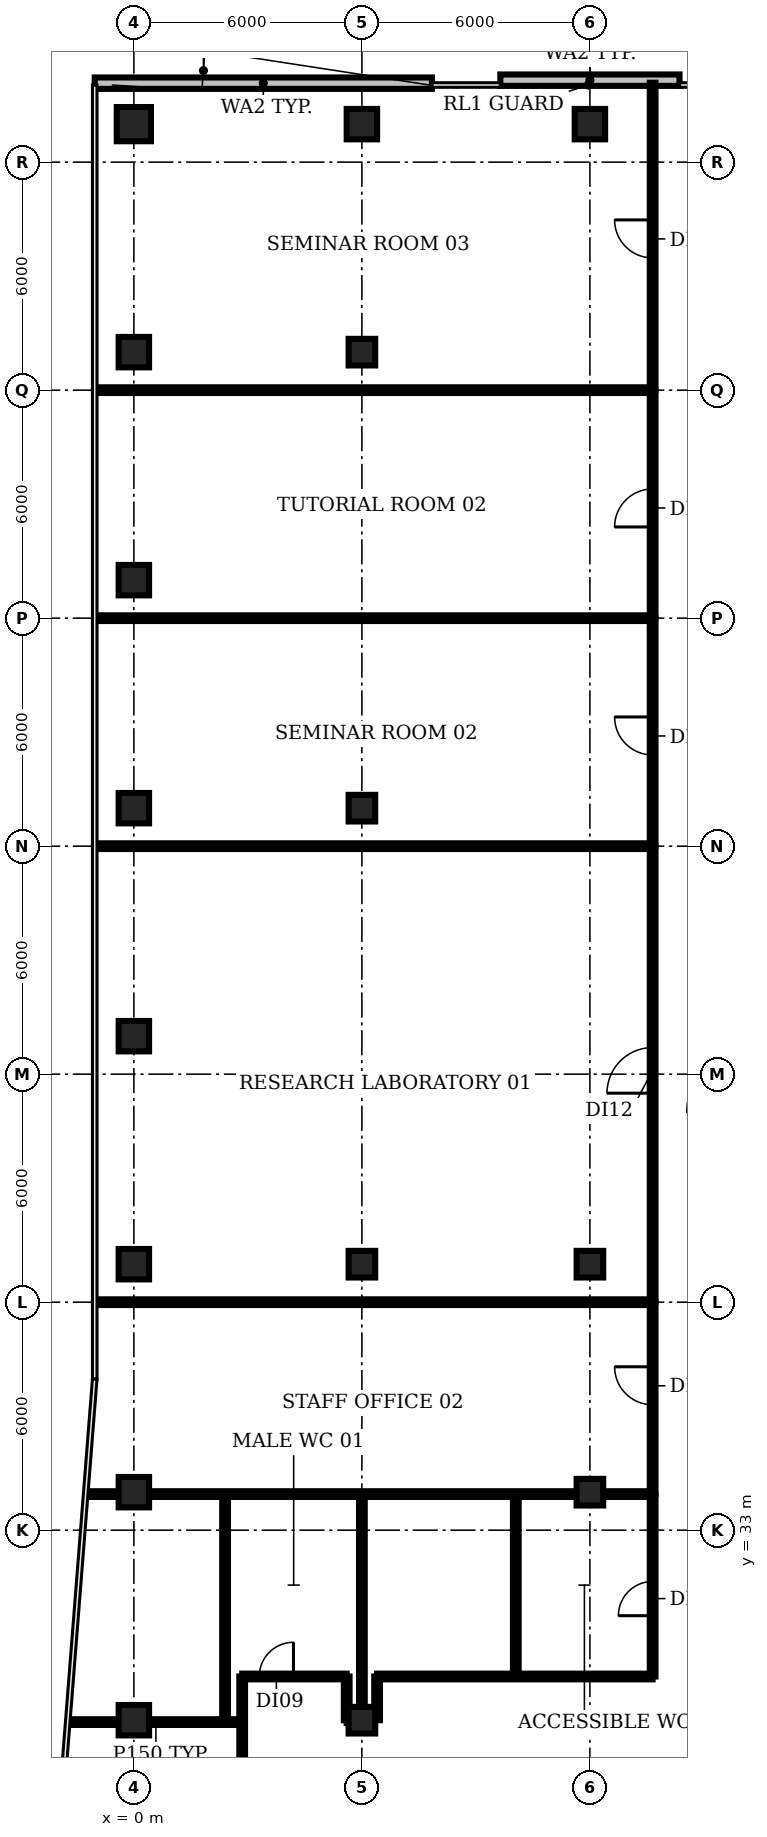
"""IFC4 building model, lengths in metres.
Left out: names, types, materials, properties, quantities, classifications, styles, units other than length and angle.
Written with IfcOpenShell. Run it as: python <this file> out.ifc"""

import sys

from ifc_helpers import new_model, si_unit, direction, frame, frame_2d, origin, origin_2d, place, context, subcontext, project, spatial, rectangle, circle, extrude, element, fill, save


model = new_model("IFC4")
c1 = context("Model", 3, precision=1e-05, world=origin(), true_north=direction((0.0, 1.0)))
c2 = subcontext(c1, "Body", "Model", "MODEL_VIEW")
j1 = project(units=[si_unit("LENGTHUNIT", "METRE"), si_unit("PLANEANGLEUNIT", "RADIAN")], contexts=[c1])
p1 = place(None, origin())
s1 = spatial("IfcSite", under=j1, at=p1, CompositionType="ELEMENT")
p2 = place(p1, origin())
s2 = spatial("IfcBuilding", under=s1, at=p2, CompositionType="ELEMENT")
p3 = place(p2, frame((0.0, 0.0, 247.4)))
s3 = spatial("IfcBuildingStorey", under=s2, at=p3, CompositionType="ELEMENT", Elevation=247.4)
for number, where, z_axis, x_axis in (
    (1, (0.0, 28.0, 0.0), (0.0, 0.0, 1.0), (1.0, 0.0, 0.0)),
    (2, (0.0, 34.0, 0.0), (0.0, 0.0, 1.0), (1.0, 0.0, 0.0)),
    (3, (0.0, 40.0, 0.0), (0.0, 0.0, 1.0), (1.0, 0.0, 0.0)),
    (4, (0.0, 46.0, 0.0), (0.0, 0.0, 1.0), (1.0, 0.0, 0.0)),
    (5, (0.0, 52.0, 0.0), (0.0, 0.0, 1.0), (1.0, 0.0, 0.0)),
    (6, (0.0, 58.0, 0.0), (0.0, 0.0, 1.0), (1.0, 0.0, 0.0)),
    (7, (0.0, 64.0, 0.0), (0.0, 0.0, 1.0), (1.0, 0.0, 0.0)),
):
    element("IfcColumn", number, at=place(p3, frame(where, z_axis=z_axis, x_axis=x_axis)), inside=s3, PredefinedType="COLUMN", context=c2, shape_type="SweptSolid", body=[
        extrude(rectangle(XDim=0.8, YDim=0.8, at=origin_2d()), origin(), (0.0, 0.0, 1.0), 3.85),
    ])
p4 = place(p3, frame((0.0, 70.0, 0.0), z_axis=(0.0, 0.0, 1.0), x_axis=(1.0, 0.0, 0.0)))
e8 = element("IfcColumn", 8, at=p4, inside=s3, PredefinedType="COLUMN", context=c2, shape_type="SweptSolid", body=[
    extrude(circle(Radius=0.45, at=origin_2d()), origin(), (0.0, 0.0, 1.0), 3.85),
])
for number, where, z_axis, x_axis in (
    (9, (6.0, 28.0, 0.0), (0.0, 0.0, 1.0), (1.0, 0.0, 0.0)),
    (10, (6.0, 40.0, 0.0), (0.0, 0.0, 1.0), (1.0, 0.0, 0.0)),
    (11, (6.0, 52.0, 0.0), (0.0, 0.0, 1.0), (1.0, 0.0, 0.0)),
    (12, (6.0, 64.0, 0.0), (0.0, 0.0, 1.0), (1.0, 0.0, 0.0)),
):
    element("IfcColumn", number, at=place(p3, frame(where, z_axis=z_axis, x_axis=x_axis)), inside=s3, PredefinedType="COLUMN", context=c2, shape_type="SweptSolid", body=[
        extrude(rectangle(XDim=0.7, YDim=0.7, at=origin_2d()), origin(), (0.0, 0.0, 1.0), 3.85),
    ])
p5 = place(p3, frame((6.0, 70.0, 0.0), z_axis=(0.0, 0.0, 1.0), x_axis=(1.0, 0.0, 0.0)))
e13 = element("IfcColumn", 13, at=p5, inside=s3, PredefinedType="COLUMN", context=c2, shape_type="SweptSolid", body=[
    extrude(rectangle(XDim=0.8, YDim=0.8, at=origin_2d()), origin(), (0.0, 0.0, 1.0), 3.85),
])
for number, where, z_axis, x_axis in (
    (14, (12.0, 34.0, 0.0), (0.0, 0.0, 1.0), (1.0, 0.0, 0.0)),
    (15, (12.0, 40.0, 0.0), (0.0, 0.0, 1.0), (1.0, 0.0, 0.0)),
):
    element("IfcColumn", number, at=place(p3, frame(where, z_axis=z_axis, x_axis=x_axis)), inside=s3, PredefinedType="COLUMN", context=c2, shape_type="SweptSolid", body=[
        extrude(rectangle(XDim=0.7, YDim=0.7, at=origin_2d()), origin(), (0.0, 0.0, 1.0), 3.85),
    ])
p6 = place(p3, frame((12.0, 70.0, 0.0), z_axis=(0.0, 0.0, 1.0), x_axis=(1.0, 0.0, 0.0)))
e16 = element("IfcColumn", 16, at=p6, inside=s3, PredefinedType="COLUMN", context=c2, shape_type="SweptSolid", body=[
    extrude(rectangle(XDim=0.8, YDim=0.8, at=origin_2d()), origin(), (0.0, 0.0, 1.0), 3.85),
])
p7 = place(p3, frame((14.357, 71.157, 0.0), z_axis=(0.0, 0.0, 1.0), x_axis=(-1.0, 0.0, 0.0)))
e17 = element("IfcWall", 17, at=p7, inside=s3, PredefinedType="SOLIDWALL", context=c2, shape_type="SweptSolid", body=[
    extrude(rectangle(XDim=4.715, YDim=0.3, at=frame_2d((2.357, 0.0))), origin(), (0.0, 0.0, 1.0), 3.85),
])
p8 = place(p3, frame((7.843, 71.078, 0.0), z_axis=(0.0, 0.0, 1.0), x_axis=(-1.0, 0.0, 0.0)))
e18 = element("IfcWall", 18, at=p8, inside=s3, PredefinedType="SOLIDWALL", context=c2, shape_type="SweptSolid", body=[
    extrude(rectangle(XDim=8.873, YDim=0.3, at=frame_2d((4.436, 0.0))), origin(), (0.0, 0.0, 1.0), 3.85),
])
p9 = place(p3, frame((-1.69, 27.95, 0.0), z_axis=(0.0, 0.0, 1.0), x_axis=(1.0, 0.0, 0.0)))
e19 = element("IfcWall", 19, at=p9, inside=s3, PredefinedType="PARTITIONING", context=c2, shape_type="SweptSolid", body=[
    extrude(rectangle(XDim=4.54, YDim=0.15, at=frame_2d((2.27, 0.0))), origin(), (0.0, 0.0, 1.0), 2.88),
])
p10 = place(p3, frame((-1.22, 33.95, 0.0), z_axis=(0.0, 0.0, 1.0), x_axis=(1.0, 0.0, 0.0)))
e20 = element("IfcWall", 20, at=p10, inside=s3, PredefinedType="PARTITIONING", context=c2, shape_type="SweptSolid", body=[
    extrude(rectangle(XDim=14.87, YDim=0.15, at=frame_2d((7.435, 0.0))), origin(), (0.0, 0.0, 1.0), 2.88),
])
for number, where, z_axis, x_axis in (
    (21, (-0.98, 39.0, 0.0), (0.0, 0.0, 1.0), (1.0, 0.0, 0.0)),
    (22, (-0.98, 51.0, 0.0), (0.0, 0.0, 1.0), (1.0, 0.0, 0.0)),
    (23, (-0.98, 57.0, 0.0), (0.0, 0.0, 1.0), (1.0, 0.0, 0.0)),
    (24, (-0.98, 63.0, 0.0), (0.0, 0.0, 1.0), (1.0, 0.0, 0.0)),
):
    element("IfcWall", number, at=place(p3, frame(where, z_axis=z_axis, x_axis=x_axis)), inside=s3, PredefinedType="PARTITIONING", context=c2, shape_type="SweptSolid", body=[
        extrude(rectangle(XDim=14.63, YDim=0.15, at=frame_2d((7.315, 0.0))), origin(), (0.0, 0.0, 1.0), 2.88),
    ])
p11 = place(p3, frame((2.4, 27.95, 0.0), z_axis=(0.0, 0.0, 1.0), x_axis=(0.0, 1.0, 0.0)))
e25 = element("IfcWall", 25, at=p11, inside=s3, PredefinedType="PARTITIONING", context=c2, shape_type="SweptSolid", body=[
    extrude(rectangle(XDim=6.0, YDim=0.15, at=frame_2d((3.0, 0.0))), origin(), (0.0, 0.0, 1.0), 2.88),
])
p12 = place(p3, frame((2.85, 25.25, 0.0), z_axis=(0.0, 0.0, 1.0), x_axis=(0.0, 1.0, 0.0)))
e26 = element("IfcWall", 26, at=p12, inside=s3, PredefinedType="PARTITIONING", context=c2, shape_type="SweptSolid", body=[
    extrude(rectangle(XDim=3.9, YDim=0.15, at=frame_2d((1.95, 0.0))), origin(), (0.0, 0.0, 1.0), 2.88),
])
p13 = place(p3, frame((2.85, 29.15, 0.0), z_axis=(0.0, 0.0, 1.0), x_axis=(1.0, 0.0, 0.0)))
e27 = element("IfcWall", 27, at=p13, inside=s3, PredefinedType="PARTITIONING", context=c2, shape_type="SweptSolid", body=[
    extrude(rectangle(XDim=2.75, YDim=0.15, at=frame_2d((1.375, 0.0))), origin(), (0.0, 0.0, 1.0), 2.88),
])
p14 = place(p13, frame((0.45, 0.0, 0.0)))
e28 = element("IfcOpeningElement", 28, at=p14, cuts=e27, PredefinedType="OPENING", context=c2, shape_type="SweptSolid", body=[
    extrude(rectangle(XDim=0.9, YDim=2.1, at=frame_2d((0.45, 1.05))), frame((0.0, 0.085, 0.0), z_axis=(0.0, -1.0, 0.0), x_axis=(1.0, 0.0, 0.0)), (0.0, 0.0, 1.0), 0.17),
])
p15 = place(p3, frame((5.6, 28.0, 0.0), z_axis=(0.0, 0.0, 1.0), x_axis=(0.0, 1.0, 0.0)))
e29 = element("IfcWall", 29, at=p15, inside=s3, PredefinedType="PARTITIONING", context=c2, shape_type="SweptSolid", body=[
    extrude(rectangle(XDim=1.15, YDim=0.15, at=frame_2d((0.575, 0.0))), origin(), (0.0, 0.0, 1.0), 2.88),
])
p16 = place(p3, frame((5.6, 28.0, 0.0), z_axis=(0.0, 0.0, 1.0), x_axis=(1.0, 0.0, 0.0)))
e30 = element("IfcWall", 30, at=p16, inside=s3, PredefinedType="PARTITIONING", context=c2, shape_type="SweptSolid", body=[
    extrude(rectangle(XDim=0.4, YDim=0.15, at=frame_2d((0.2, 0.0))), origin(), (0.0, 0.0, 1.0), 2.88),
])
p17 = place(p3, frame((6.0, 28.0, 0.0), z_axis=(0.0, 0.0, 1.0), x_axis=(0.0, 1.0, 0.0)))
e31 = element("IfcWall", 31, at=p17, inside=s3, PredefinedType="PARTITIONING", context=c2, shape_type="SweptSolid", body=[
    extrude(rectangle(XDim=5.95, YDim=0.15, at=frame_2d((2.975, 0.0))), origin(), (0.0, 0.0, 1.0), 2.88),
])
p18 = place(p3, frame((6.4, 28.0, 0.0), z_axis=(0.0, 0.0, 1.0), x_axis=(0.0, 1.0, 0.0)))
e32 = element("IfcWall", 32, at=p18, inside=s3, PredefinedType="PARTITIONING", context=c2, shape_type="SweptSolid", body=[
    extrude(rectangle(XDim=1.15, YDim=0.15, at=frame_2d((0.575, 0.0))), origin(), (0.0, 0.0, 1.0), 2.88),
])
p19 = place(p3, frame((6.4, 29.15, 0.0), z_axis=(0.0, 0.0, 1.0), x_axis=(1.0, 0.0, 0.0)))
e33 = element("IfcWall", 33, at=p19, inside=s3, PredefinedType="PARTITIONING", context=c2, shape_type="SweptSolid", body=[
    extrude(rectangle(XDim=7.25, YDim=0.15, at=frame_2d((3.625, 0.0))), origin(), (0.0, 0.0, 1.0), 2.88),
])
p20 = place(p3, frame((10.05, 29.15, 0.0), z_axis=(0.0, 0.0, 1.0), x_axis=(0.0, 1.0, 0.0)))
e34 = element("IfcWall", 34, at=p20, inside=s3, PredefinedType="PARTITIONING", context=c2, shape_type="SweptSolid", body=[
    extrude(rectangle(XDim=4.8, YDim=0.15, at=frame_2d((2.4, 0.0))), origin(), (0.0, 0.0, 1.0), 2.88),
])
p21 = place(p3, frame((13.65, 29.15, 0.0), z_axis=(0.0, 0.0, 1.0), x_axis=(0.0, 1.0, 0.0)))
e35 = element("IfcWall", 35, at=p21, inside=s3, PredefinedType="PARTITIONING", context=c2, shape_type="SweptSolid", body=[
    extrude(rectangle(XDim=4.8, YDim=0.15, at=frame_2d((2.4, 0.0))), origin(), (0.0, 0.0, 1.0), 2.88),
])
p22 = place(p21, frame((1.6, 0.0, 0.0)))
e36 = element("IfcOpeningElement", 36, at=p22, cuts=e35, PredefinedType="OPENING", context=c2, shape_type="SweptSolid", body=[
    extrude(rectangle(XDim=0.9, YDim=2.1, at=frame_2d((0.45, 1.05))), frame((0.0, 0.085, 0.0), z_axis=(0.0, -1.0, 0.0), x_axis=(1.0, 0.0, 0.0)), (0.0, 0.0, 1.0), 0.17),
])
p23 = place(p3, frame((13.65, 33.95, 0.0), z_axis=(0.0, 0.0, 1.0), x_axis=(0.0, 1.0, 0.0)))
e37 = element("IfcWall", 37, at=p23, inside=s3, PredefinedType="PARTITIONING", context=c2, shape_type="SweptSolid", body=[
    extrude(rectangle(XDim=5.05, YDim=0.15, at=frame_2d((2.525, 0.0))), origin(), (0.0, 0.0, 1.0), 2.88),
])
p24 = place(p23, frame((2.35, 0.0, 0.0)))
e38 = element("IfcOpeningElement", 38, at=p24, cuts=e37, PredefinedType="OPENING", context=c2, shape_type="SweptSolid", body=[
    extrude(rectangle(XDim=1.0, YDim=2.1, at=frame_2d((0.5, 1.05))), frame((0.0, 0.085, 0.0), z_axis=(0.0, -1.0, 0.0), x_axis=(1.0, 0.0, 0.0)), (0.0, 0.0, 1.0), 0.17),
])
p25 = place(p3, frame((13.65, 39.0, 0.0), z_axis=(0.0, 0.0, 1.0), x_axis=(0.0, 1.0, 0.0)))
e39 = element("IfcWall", 39, at=p25, inside=s3, PredefinedType="PARTITIONING", context=c2, shape_type="SweptSolid", body=[
    extrude(rectangle(XDim=12.0, YDim=0.15, at=frame_2d((6.0, 0.0))), origin(), (0.0, 0.0, 1.0), 2.88),
])
p26 = place(p25, frame((5.5, 0.0, 0.0)))
e40 = element("IfcOpeningElement", 40, at=p26, cuts=e39, PredefinedType="OPENING", context=c2, shape_type="SweptSolid", body=[
    extrude(rectangle(XDim=1.2, YDim=2.1, at=frame_2d((0.6, 1.05))), frame((0.0, 0.085, 0.0), z_axis=(0.0, -1.0, 0.0), x_axis=(1.0, 0.0, 0.0)), (0.0, 0.0, 1.0), 0.17),
])
p27 = place(p3, frame((13.65, 51.0, 0.0), z_axis=(0.0, 0.0, 1.0), x_axis=(0.0, 1.0, 0.0)))
e41 = element("IfcWall", 41, at=p27, inside=s3, PredefinedType="PARTITIONING", context=c2, shape_type="SweptSolid", body=[
    extrude(rectangle(XDim=6.0, YDim=0.15, at=frame_2d((3.0, 0.0))), origin(), (0.0, 0.0, 1.0), 2.88),
])
p28 = place(p27, frame((2.4, 0.0, 0.0)))
e42 = element("IfcOpeningElement", 42, at=p28, cuts=e41, PredefinedType="OPENING", context=c2, shape_type="SweptSolid", body=[
    extrude(rectangle(XDim=1.0, YDim=2.1, at=frame_2d((0.5, 1.05))), frame((0.0, 0.085, 0.0), z_axis=(0.0, -1.0, 0.0), x_axis=(1.0, 0.0, 0.0)), (0.0, 0.0, 1.0), 0.17),
])
p29 = place(p3, frame((13.65, 57.0, 0.0), z_axis=(0.0, 0.0, 1.0), x_axis=(0.0, 1.0, 0.0)))
e43 = element("IfcWall", 43, at=p29, inside=s3, PredefinedType="PARTITIONING", context=c2, shape_type="SweptSolid", body=[
    extrude(rectangle(XDim=6.0, YDim=0.15, at=frame_2d((3.0, 0.0))), origin(), (0.0, 0.0, 1.0), 2.88),
])
p30 = place(p29, frame((2.4, 0.0, 0.0)))
e44 = element("IfcOpeningElement", 44, at=p30, cuts=e43, PredefinedType="OPENING", context=c2, shape_type="SweptSolid", body=[
    extrude(rectangle(XDim=1.0, YDim=2.1, at=frame_2d((0.5, 1.05))), frame((0.0, 0.085, 0.0), z_axis=(0.0, -1.0, 0.0), x_axis=(1.0, 0.0, 0.0)), (0.0, 0.0, 1.0), 0.17),
])
p31 = place(p3, frame((13.65, 63.0, 0.0), z_axis=(0.0, 0.0, 1.0), x_axis=(0.0, 1.0, 0.0)))
e45 = element("IfcWall", 45, at=p31, inside=s3, PredefinedType="PARTITIONING", context=c2, shape_type="SweptSolid", body=[
    extrude(rectangle(XDim=8.09, YDim=0.15, at=frame_2d((4.045, 0.0))), origin(), (0.0, 0.0, 1.0), 2.88),
])
p32 = place(p31, frame((3.48, 0.0, 0.0)))
e46 = element("IfcOpeningElement", 46, at=p32, cuts=e45, PredefinedType="OPENING", context=c2, shape_type="SweptSolid", body=[
    extrude(rectangle(XDim=1.0, YDim=2.1, at=frame_2d((0.5, 1.05))), frame((0.0, 0.085, 0.0), z_axis=(0.0, -1.0, 0.0), x_axis=(1.0, 0.0, 0.0)), (0.0, 0.0, 1.0), 0.17),
])
p33 = place(p14, origin())
e47 = element("IfcDoor", 47, at=p33, inside=s3, OperationType="SINGLE_SWING_RIGHT", PredefinedType="DOOR", context=c2, shape_type="SweptSolid", body=[
    extrude(rectangle(XDim=0.9, YDim=2.1, at=frame_2d((0.45, 1.05))), frame((0.0, 0.025, 0.0), z_axis=(0.0, -1.0, 0.0), x_axis=(1.0, 0.0, 0.0)), (0.0, 0.0, 1.0), 0.05),
])
fill(e28, e47)
p34 = place(p22, origin())
e48 = element("IfcDoor", 48, at=p34, inside=s3, OperationType="SINGLE_SWING_LEFT", PredefinedType="DOOR", context=c2, shape_type="SweptSolid", body=[
    extrude(rectangle(XDim=0.9, YDim=2.1, at=frame_2d((0.45, 1.05))), frame((0.0, 0.025, 0.0), z_axis=(0.0, -1.0, 0.0), x_axis=(1.0, 0.0, 0.0)), (0.0, 0.0, 1.0), 0.05),
])
fill(e36, e48)
p35 = place(p24, origin())
e49 = element("IfcDoor", 49, at=p35, inside=s3, OperationType="SINGLE_SWING_RIGHT", PredefinedType="DOOR", context=c2, shape_type="SweptSolid", body=[
    extrude(rectangle(XDim=1.0, YDim=2.1, at=frame_2d((0.5, 1.05))), frame((0.0, 0.025, 0.0), z_axis=(0.0, -1.0, 0.0), x_axis=(1.0, 0.0, 0.0)), (0.0, 0.0, 1.0), 0.05),
])
fill(e38, e49)
p36 = place(p26, origin())
e50 = element("IfcDoor", 50, at=p36, inside=s3, OperationType="SINGLE_SWING_LEFT", PredefinedType="DOOR", context=c2, shape_type="SweptSolid", body=[
    extrude(rectangle(XDim=1.2, YDim=2.1, at=frame_2d((0.6, 1.05))), frame((0.0, 0.025, 0.0), z_axis=(0.0, -1.0, 0.0), x_axis=(1.0, 0.0, 0.0)), (0.0, 0.0, 1.0), 0.05),
])
fill(e40, e50)
p37 = place(p28, origin())
e51 = element("IfcDoor", 51, at=p37, inside=s3, OperationType="SINGLE_SWING_RIGHT", PredefinedType="DOOR", context=c2, shape_type="SweptSolid", body=[
    extrude(rectangle(XDim=1.0, YDim=2.1, at=frame_2d((0.5, 1.05))), frame((0.0, 0.025, 0.0), z_axis=(0.0, -1.0, 0.0), x_axis=(1.0, 0.0, 0.0)), (0.0, 0.0, 1.0), 0.05),
])
fill(e42, e51)
p38 = place(p30, origin())
e52 = element("IfcDoor", 52, at=p38, inside=s3, OperationType="SINGLE_SWING_LEFT", PredefinedType="DOOR", context=c2, shape_type="SweptSolid", body=[
    extrude(rectangle(XDim=1.0, YDim=2.1, at=frame_2d((0.5, 1.05))), frame((0.0, 0.025, 0.0), z_axis=(0.0, -1.0, 0.0), x_axis=(1.0, 0.0, 0.0)), (0.0, 0.0, 1.0), 0.05),
])
fill(e44, e52)
p39 = place(p32, origin())
e53 = element("IfcDoor", 53, at=p39, inside=s3, OperationType="SINGLE_SWING_RIGHT", PredefinedType="DOOR", context=c2, shape_type="SweptSolid", body=[
    extrude(rectangle(XDim=1.0, YDim=2.1, at=frame_2d((0.5, 1.05))), frame((0.0, 0.025, 0.0), z_axis=(0.0, -1.0, 0.0), x_axis=(1.0, 0.0, 0.0)), (0.0, 0.0, 1.0), 0.05),
])
fill(e46, e53)
save(model, sys.argv[1])
